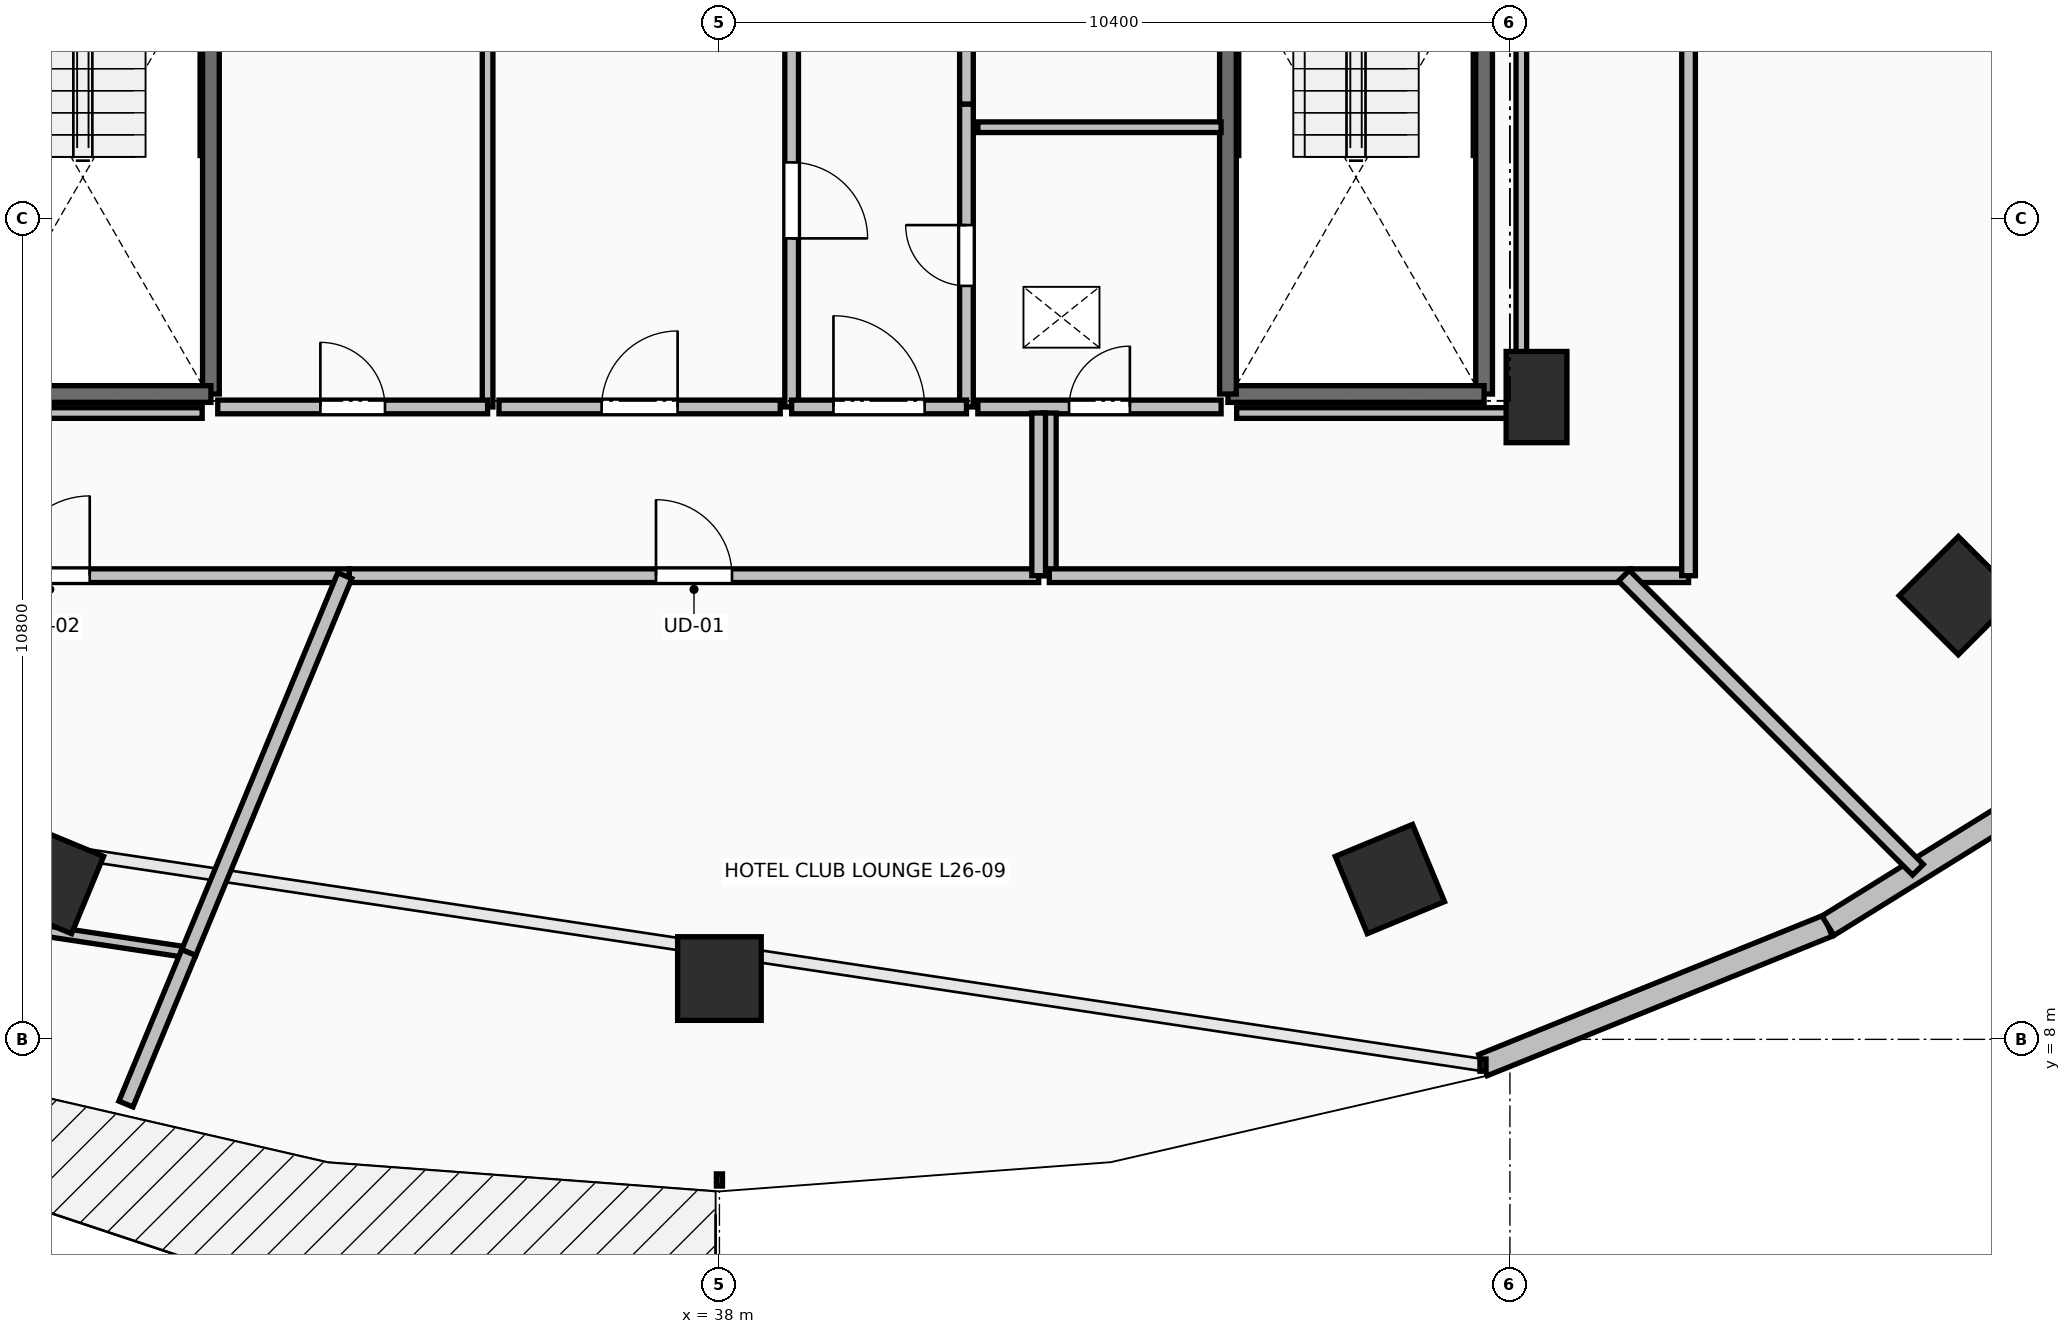
"""IFC4 building model, lengths in metres.
Left out: names, types, materials, properties, quantities, classifications, styles, units other than length and angle.
Written with IfcOpenShell. Run it as: python <this file> out.ifc"""

import sys

from ifc_helpers import new_model, si_unit, direction, frame, frame_2d, origin, origin_2d, place, context, subcontext, project, spatial, rectangle, extrude, element, fill, save


model = new_model("IFC4")
c1 = context("Model", 3, precision=1e-05, world=origin(), true_north=direction((0.0, 1.0)))
c2 = subcontext(c1, "Body", "Model", "MODEL_VIEW")
j1 = project(units=[si_unit("LENGTHUNIT", "METRE"), si_unit("PLANEANGLEUNIT", "RADIAN")], contexts=[c1])
p1 = place(None, origin())
s1 = spatial("IfcSite", under=j1, at=p1, CompositionType="ELEMENT")
p2 = place(p1, origin())
s2 = spatial("IfcBuilding", under=s1, at=p2, CompositionType="ELEMENT")
p3 = place(p2, frame((0.0, 0.0, 99.8)))
s3 = spatial("IfcBuildingStorey", under=s2, at=p3, CompositionType="ELEMENT", Elevation=99.8)
for number, where, z_axis, x_axis in (
    (1, (29.179, 10.109, 0.0), (0.0, 0.0, 1.0), (-0.383, -0.924, 0.0)),
    (2, (38.0, 8.8, 0.0), (0.0, 0.0, 1.0), (0.0, -1.0, 0.0)),
    (3, (46.821, 10.109, 0.0), (0.0, 0.0, 1.0), (0.383, -0.924, 0.0)),
    (4, (54.299, 13.838, 0.0), (0.0, 0.0, 1.0), (0.707, -0.707, 0.0)),
):
    element("IfcColumn", number, at=place(p3, frame(where, z_axis=z_axis, x_axis=x_axis)), inside=s3, PredefinedType="COLUMN", context=c2, shape_type="SweptSolid", body=[
        extrude(rectangle(XDim=1.1, YDim=1.1, at=origin_2d()), origin(), (0.0, 0.0, 1.0), 3.5),
    ])
p4 = place(p3, frame((48.75, 16.45, 0.0), z_axis=(0.0, 0.0, 1.0), x_axis=(1.0, 0.0, 0.0)))
e5 = element("IfcColumn", 5, at=p4, inside=s3, PredefinedType="PILASTER", context=c2, shape_type="SweptSolid", body=[
    extrude(rectangle(XDim=0.8, YDim=1.2, at=origin_2d()), origin(), (0.0, 0.0, 1.0), 3.5),
])
p5 = place(p3, frame((48.045, 7.661, 0.0), z_axis=(0.0, 0.0, 1.0), x_axis=(0.927122233109, 0.374759075775, 0.0)))
e6 = element("IfcWall", 6, at=p5, inside=s3, PredefinedType="STANDARD", context=c2, shape_type="SweptSolid", body=[
    extrude(rectangle(XDim=4.895, YDim=0.3, at=frame_2d((2.448, 0.0))), origin(), (0.0, 0.0, 1.0), 3.24),
])
p6 = place(p3, frame((52.584, 9.495, 0.0), z_axis=(0.0, 0.0, 1.0), x_axis=(0.849684479743, 0.527291461038, 0.0)))
e7 = element("IfcWall", 7, at=p6, inside=s3, PredefinedType="STANDARD", context=c2, shape_type="SweptSolid", body=[
    extrude(rectangle(XDim=4.681, YDim=0.3, at=frame_2d((2.341, 0.0))), origin(), (0.0, 0.0, 1.0), 3.24),
])
p7 = place(p3, frame((31.31, 23.91, 0.0), z_axis=(0.0, 0.0, 1.0), x_axis=(0.0, -1.0, 0.0)))
e8 = element("IfcWall", 8, at=p7, inside=s3, PredefinedType="SOLIDWALL", context=c2, shape_type="SweptSolid", body=[
    extrude(rectangle(XDim=7.42, YDim=0.22, at=frame_2d((3.71, 0.0))), origin(), (0.0, 0.0, 1.0), 3.24),
])
p8 = place(p3, frame((31.31, 16.49, 0.0), z_axis=(0.0, 0.0, 1.0), x_axis=(-1.0, 0.0, 0.0)))
e9 = element("IfcWall", 9, at=p8, inside=s3, PredefinedType="SOLIDWALL", context=c2, shape_type="SweptSolid", body=[
    extrude(rectangle(XDim=3.37, YDim=0.22, at=frame_2d((1.685, 0.0))), origin(), (0.0, 0.0, 1.0), 3.24),
])
p9 = place(p3, frame((48.06, 23.91, 0.0), z_axis=(0.0, 0.0, 1.0), x_axis=(0.0, -1.0, 0.0)))
e10 = element("IfcWall", 10, at=p9, inside=s3, PredefinedType="SOLIDWALL", context=c2, shape_type="SweptSolid", body=[
    extrude(rectangle(XDim=7.42, YDim=0.22, at=frame_2d((3.71, 0.0))), origin(), (0.0, 0.0, 1.0), 3.24),
])
p10 = place(p3, frame((48.06, 16.49, 0.0), z_axis=(0.0, 0.0, 1.0), x_axis=(-1.0, 0.0, 0.0)))
e11 = element("IfcWall", 11, at=p10, inside=s3, PredefinedType="SOLIDWALL", context=c2, shape_type="SweptSolid", body=[
    extrude(rectangle(XDim=3.37, YDim=0.22, at=frame_2d((1.685, 0.0))), origin(), (0.0, 0.0, 1.0), 3.24),
])
p11 = place(p3, frame((44.69, 16.49, 0.0), z_axis=(0.0, 0.0, 1.0), x_axis=(0.0, 1.0, 0.0)))
e12 = element("IfcWall", 12, at=p11, inside=s3, PredefinedType="SOLIDWALL", context=c2, shape_type="SweptSolid", body=[
    extrude(rectangle(XDim=7.42, YDim=0.22, at=frame_2d((3.71, 0.0))), origin(), (0.0, 0.0, 1.0), 3.24),
])
p12 = place(p3, frame((41.25, 16.32, 0.0), z_axis=(0.0, 0.0, 1.0), x_axis=(0.0, 1.0, 0.0)))
e13 = element("IfcWall", 13, at=p12, inside=s3, PredefinedType="PARTITIONING", context=c2, shape_type="SweptSolid", body=[
    extrude(rectangle(XDim=3.985, YDim=0.18, at=frame_2d((1.992, 0.0))), origin(), (0.0, 0.0, 1.0), 3.24),
])
p13 = place(p12, frame((1.593, 0.0, 0.0)))
e14 = element("IfcOpeningElement", 14, at=p13, cuts=e13, PredefinedType="OPENING", context=c2, shape_type="SweptSolid", body=[
    extrude(rectangle(XDim=0.8, YDim=2.05, at=frame_2d((0.4, 1.025))), frame((0.0, 0.105, 0.0), z_axis=(0.0, -1.0, 0.0), x_axis=(1.0, 0.0, 0.0)), (0.0, 0.0, 1.0), 0.21),
])
p14 = place(p3, frame((41.25, 20.305, 0.0), z_axis=(0.0, 0.0, 1.0), x_axis=(0.0, 1.0, 0.0)))
e15 = element("IfcWall", 15, at=p14, inside=s3, PredefinedType="PARTITIONING", context=c2, shape_type="SweptSolid", body=[
    extrude(rectangle(XDim=3.895, YDim=0.18, at=frame_2d((1.948, 0.0))), origin(), (0.0, 0.0, 1.0), 3.24),
])
p15 = place(p14, frame((1.448, 0.0, 0.0)))
e16 = element("IfcOpeningElement", 16, at=p15, cuts=e15, PredefinedType="OPENING", context=c2, shape_type="SweptSolid", body=[
    extrude(rectangle(XDim=1.0, YDim=2.15, at=frame_2d((0.5, 1.075))), frame((0.0, 0.105, 0.0), z_axis=(0.0, -1.0, 0.0), x_axis=(1.0, 0.0, 0.0)), (0.0, 0.0, 1.0), 0.21),
])
p16 = place(p3, frame((38.95, 21.755, 0.0), z_axis=(0.0, 0.0, 1.0), x_axis=(0.0, -1.0, 0.0)))
e17 = element("IfcWall", 17, at=p16, inside=s3, PredefinedType="PARTITIONING", context=c2, shape_type="SweptSolid", body=[
    extrude(rectangle(XDim=5.435, YDim=0.18, at=frame_2d((2.717, 0.0))), origin(), (0.0, 0.0, 1.0), 3.24),
])
p17 = place(p16, frame((2.218, 0.0, 0.0)))
e18 = element("IfcOpeningElement", 18, at=p17, cuts=e17, PredefinedType="OPENING", context=c2, shape_type="SweptSolid", body=[
    extrude(rectangle(XDim=1.0, YDim=2.15, at=frame_2d((0.5, 1.075))), frame((0.0, 0.105, 0.0), z_axis=(0.0, -1.0, 0.0), x_axis=(1.0, 0.0, 0.0)), (0.0, 0.0, 1.0), 0.21),
])
p18 = place(p3, frame((38.95, 16.32, 0.0), z_axis=(0.0, 0.0, 1.0), x_axis=(1.0, 0.0, 0.0)))
e19 = element("IfcWall", 19, at=p18, inside=s3, PredefinedType="PARTITIONING", context=c2, shape_type="SweptSolid", body=[
    extrude(rectangle(XDim=2.3, YDim=0.18, at=frame_2d((1.15, 0.0))), origin(), (0.0, 0.0, 1.0), 3.24),
])
p19 = place(p18, frame((0.55, 0.0, 0.0)))
e20 = element("IfcOpeningElement", 20, at=p19, cuts=e19, PredefinedType="OPENING", context=c2, shape_type="SweptSolid", body=[
    extrude(rectangle(XDim=1.2, YDim=2.15, at=frame_2d((0.6, 1.075))), frame((0.0, 0.105, 0.0), z_axis=(0.0, -1.0, 0.0), x_axis=(1.0, 0.0, 0.0)), (0.0, 0.0, 1.0), 0.21),
])
p20 = place(p3, frame((44.6, 20.0, 0.0), z_axis=(0.0, 0.0, 1.0), x_axis=(-1.0, 0.0, 0.0)))
e21 = element("IfcWall", 21, at=p20, inside=s3, PredefinedType="PARTITIONING", context=c2, shape_type="SweptSolid", body=[
    extrude(rectangle(XDim=3.2, YDim=0.14, at=frame_2d((1.6, 0.0))), origin(), (0.0, 0.0, 1.0), 3.24),
])
p21 = place(p3, frame((41.4, 16.32, 0.0), z_axis=(0.0, 0.0, 1.0), x_axis=(1.0, 0.0, 0.0)))
e22 = element("IfcWall", 22, at=p21, inside=s3, PredefinedType="PARTITIONING", context=c2, shape_type="SweptSolid", body=[
    extrude(rectangle(XDim=3.2, YDim=0.18, at=frame_2d((1.6, 0.0))), origin(), (0.0, 0.0, 1.0), 3.24),
])
p22 = place(p21, frame((1.2, 0.0, 0.0)))
e23 = element("IfcOpeningElement", 23, at=p22, cuts=e22, PredefinedType="OPENING", context=c2, shape_type="SweptSolid", body=[
    extrude(rectangle(XDim=0.8, YDim=2.05, at=frame_2d((0.4, 1.025))), frame((0.0, 0.105, 0.0), z_axis=(0.0, -1.0, 0.0), x_axis=(1.0, 0.0, 0.0)), (0.0, 0.0, 1.0), 0.21),
])
p23 = place(p3, frame((34.95, 16.32, 0.0), z_axis=(0.0, 0.0, 1.0), x_axis=(0.0, 1.0, 0.0)))
e24 = element("IfcWall", 24, at=p23, inside=s3, PredefinedType="PARTITIONING", context=c2, shape_type="SweptSolid", body=[
    extrude(rectangle(XDim=5.13, YDim=0.14, at=frame_2d((2.565, 0.0))), origin(), (0.0, 0.0, 1.0), 3.24),
])
p24 = place(p3, frame((31.4, 16.32, 0.0), z_axis=(0.0, 0.0, 1.0), x_axis=(1.0, 0.0, 0.0)))
e25 = element("IfcWall", 25, at=p24, inside=s3, PredefinedType="PARTITIONING", context=c2, shape_type="SweptSolid", body=[
    extrude(rectangle(XDim=3.55, YDim=0.18, at=frame_2d((1.775, 0.0))), origin(), (0.0, 0.0, 1.0), 3.24),
])
p25 = place(p24, frame((1.35, 0.0, 0.0)))
e26 = element("IfcOpeningElement", 26, at=p25, cuts=e25, PredefinedType="OPENING", context=c2, shape_type="SweptSolid", body=[
    extrude(rectangle(XDim=0.85, YDim=2.1, at=frame_2d((0.425, 1.05))), frame((0.0, 0.105, 0.0), z_axis=(0.0, -1.0, 0.0), x_axis=(1.0, 0.0, 0.0)), (0.0, 0.0, 1.0), 0.21),
])
p26 = place(p3, frame((35.1, 16.32, 0.0), z_axis=(0.0, 0.0, 1.0), x_axis=(1.0, 0.0, 0.0)))
e27 = element("IfcWall", 27, at=p26, inside=s3, PredefinedType="PARTITIONING", context=c2, shape_type="SweptSolid", body=[
    extrude(rectangle(XDim=3.7, YDim=0.18, at=frame_2d((1.85, 0.0))), origin(), (0.0, 0.0, 1.0), 3.24),
])
p27 = place(p26, frame((1.35, 0.0, 0.0)))
e28 = element("IfcOpeningElement", 28, at=p27, cuts=e27, PredefinedType="OPENING", context=c2, shape_type="SweptSolid", body=[
    extrude(rectangle(XDim=1.0, YDim=2.15, at=frame_2d((0.5, 1.075))), frame((0.0, 0.105, 0.0), z_axis=(0.0, -1.0, 0.0), x_axis=(1.0, 0.0, 0.0)), (0.0, 0.0, 1.0), 0.21),
])
p28 = place(p3, frame((25.25, 14.1, 0.0), z_axis=(0.0, 0.0, 1.0), x_axis=(1.0, 0.0, 0.0)))
e29 = element("IfcWall", 29, at=p28, inside=s3, PredefinedType="PARTITIONING", context=c2, shape_type="SweptSolid", body=[
    extrude(rectangle(XDim=7.881, YDim=0.18, at=frame_2d((3.94, 0.0))), origin(), (0.0, 0.0, 1.0), 2.432),
])
p29 = place(p28, frame((3.416, 0.0, 0.0)))
e30 = element("IfcOpeningElement", 30, at=p29, cuts=e29, PredefinedType="OPENING", context=c2, shape_type="SweptSolid", body=[
    extrude(rectangle(XDim=1.05, YDim=2.2, at=frame_2d((0.525, 1.1))), frame((0.0, 0.105, 0.0), z_axis=(0.0, -1.0, 0.0), x_axis=(1.0, 0.0, 0.0)), (0.0, 0.0, 1.0), 0.21),
])
p30 = place(p3, frame((42.34, 16.24, 0.0), z_axis=(0.0, 0.0, 1.0), x_axis=(0.0, -1.0, 0.0)))
e31 = element("IfcWall", 31, at=p30, inside=s3, PredefinedType="PARTITIONING", context=c2, shape_type="SweptSolid", body=[
    extrude(rectangle(XDim=2.14, YDim=0.18, at=frame_2d((1.07, 0.0))), origin(), (0.0, 0.0, 1.0), 3.24),
])
p31 = place(p3, frame((42.34, 14.1, 0.0), z_axis=(0.0, 0.0, 1.0), x_axis=(1.0, 0.0, 0.0)))
e32 = element("IfcWall", 32, at=p31, inside=s3, PredefinedType="PARTITIONING", context=c2, shape_type="SweptSolid", body=[
    extrude(rectangle(XDim=7.645, YDim=0.18, at=frame_2d((3.823, 0.0))), origin(), (0.0, 0.0, 1.0), 2.432),
])
p32 = place(p3, frame((33.131, 14.1, 0.0), z_axis=(0.0, 0.0, 1.0), x_axis=(1.0, 0.0, 0.0)))
e33 = element("IfcWall", 33, at=p32, inside=s3, PredefinedType="PARTITIONING", context=c2, shape_type="SweptSolid", body=[
    extrude(rectangle(XDim=9.069, YDim=0.18, at=frame_2d((4.534, 0.0))), origin(), (0.0, 0.0, 1.0), 2.886),
])
p33 = place(p32, frame((4.034, 0.0, 0.0)))
e34 = element("IfcOpeningElement", 34, at=p33, cuts=e33, PredefinedType="OPENING", context=c2, shape_type="SweptSolid", body=[
    extrude(rectangle(XDim=1.0, YDim=2.15, at=frame_2d((0.5, 1.075))), frame((0.0, 0.105, 0.0), z_axis=(0.0, -1.0, 0.0), x_axis=(1.0, 0.0, 0.0)), (0.0, 0.0, 1.0), 0.21),
])
p34 = place(p3, frame((42.2, 14.1, 0.0), z_axis=(0.0, 0.0, 1.0), x_axis=(0.0, 1.0, 0.0)))
e35 = element("IfcWall", 35, at=p34, inside=s3, PredefinedType="PARTITIONING", context=c2, shape_type="SweptSolid", body=[
    extrude(rectangle(XDim=2.14, YDim=0.18, at=frame_2d((1.07, 0.0))), origin(), (0.0, 0.0, 1.0), 3.24),
])
p35 = place(p3, frame((49.985, 14.1, 0.0), z_axis=(0.0, 0.0, 1.0), x_axis=(1.0, 0.0, 0.0)))
e36 = element("IfcWall", 36, at=p35, inside=s3, PredefinedType="PARTITIONING", context=c2, shape_type="SweptSolid", body=[
    extrude(rectangle(XDim=0.765, YDim=0.18, at=frame_2d((0.382, 0.0))), origin(), (0.0, 0.0, 1.0), 2.972),
])
p36 = place(p3, frame((50.75, 14.1, 0.0), z_axis=(0.0, 0.0, 1.0), x_axis=(0.0, 1.0, 0.0)))
e37 = element("IfcWall", 37, at=p36, inside=s3, PredefinedType="PARTITIONING", context=c2, shape_type="SweptSolid", body=[
    extrude(rectangle(XDim=16.981, YDim=0.18, at=frame_2d((8.49, 0.0))), origin(), (0.0, 0.0, 1.0), 2.432),
])
p37 = place(p36, frame((7.99, 0.0, 0.0)))
e38 = element("IfcOpeningElement", 38, at=p37, cuts=e37, PredefinedType="OPENING", context=c2, shape_type="SweptSolid", body=[
    extrude(rectangle(XDim=1.0, YDim=2.15, at=frame_2d((0.5, 1.075))), frame((0.0, 0.105, 0.0), z_axis=(0.0, -1.0, 0.0), x_axis=(1.0, 0.0, 0.0)), (0.0, 0.0, 1.0), 0.21),
])
p38 = place(p3, frame((28.938, 9.455, 0.0), z_axis=(0.0, 0.0, 1.0), x_axis=(0.988868142427, -0.148794478708, 0.0)))
e39 = element("IfcWall", 39, at=p38, inside=s3, PredefinedType="PARTITIONING", context=c2, shape_type="SweptSolid", body=[
    extrude(rectangle(XDim=2.104, YDim=0.14, at=frame_2d((1.052, 0.0))), origin(), (0.0, 0.0, 1.0), 3.24),
])
p39 = place(p3, frame((31.018, 9.142, 0.0), z_axis=(0.0, 0.0, 1.0), x_axis=(0.382572793579, 0.923925352836, 0.0)))
e40 = element("IfcWall", 40, at=p39, inside=s3, PredefinedType="PARTITIONING", context=c2, shape_type="SweptSolid", body=[
    extrude(rectangle(XDim=5.366, YDim=0.2, at=frame_2d((2.683, 0.0))), origin(), (0.0, 0.0, 1.0), 2.677),
])
p40 = place(p3, frame((30.192, 7.149, 0.0), z_axis=(0.0, 0.0, 1.0), x_axis=(0.382911401564, 0.923785071622, 0.0)))
e41 = element("IfcWall", 41, at=p40, inside=s3, PredefinedType="PARTITIONING", context=c2, shape_type="SweptSolid", body=[
    extrude(rectangle(XDim=2.158, YDim=0.2, at=frame_2d((1.079, 0.0))), origin(), (0.0, 0.0, 1.0), 3.24),
])
p41 = place(p3, frame((53.768, 10.232, 0.0), z_axis=(0.0, 0.0, 1.0), x_axis=(-0.707106781187, 0.707106781187, 0.0)))
e42 = element("IfcWall", 42, at=p41, inside=s3, PredefinedType="PARTITIONING", context=c2, shape_type="SweptSolid", body=[
    extrude(rectangle(XDim=5.47, YDim=0.2, at=frame_2d((2.735, 0.0))), origin(), (0.0, 0.0, 1.0), 2.677),
])
p42 = place(p3, frame((48.55, 23.754, 0.0), z_axis=(0.0, 0.0, 1.0), x_axis=(0.0, -1.0, 0.0)))
e43 = element("IfcWall", 43, at=p42, inside=s3, PredefinedType="PARTITIONING", context=c2, shape_type="SweptSolid", body=[
    extrude(rectangle(XDim=7.514, YDim=0.14, at=frame_2d((3.757, 0.0))), origin(), (0.0, 0.0, 1.0), 2.432),
])
for number, where, z_axis, x_axis in (
    (44, (48.55, 16.24, 0.0), (0.0, 0.0, 1.0), (-1.0, 0.0, 0.0)),
    (45, (31.195, 16.24, 0.0), (0.0, 0.0, 1.0), (-1.0, 0.0, 0.0)),
):
    element("IfcWall", number, at=place(p3, frame(where, z_axis=z_axis, x_axis=x_axis)), inside=s3, PredefinedType="PARTITIONING", context=c2, shape_type="SweptSolid", body=[
        extrude(rectangle(XDim=3.745, YDim=0.14, at=frame_2d((1.873, 0.0))), origin(), (0.0, 0.0, 1.0), 2.432),
    ])
p43 = place(p13, origin())
e46 = element("IfcDoor", 46, at=p43, inside=s3, OperationType="SINGLE_SWING_RIGHT", PredefinedType="DOOR", context=c2, shape_type="SweptSolid", body=[
    extrude(rectangle(XDim=0.8, YDim=2.05, at=frame_2d((0.4, 1.025))), frame((0.0, 0.025, 0.0), z_axis=(0.0, -1.0, 0.0), x_axis=(1.0, 0.0, 0.0)), (0.0, 0.0, 1.0), 0.05),
])
fill(e14, e46)
p44 = place(p17, origin())
e47 = element("IfcDoor", 47, at=p44, inside=s3, OperationType="SINGLE_SWING_RIGHT", PredefinedType="DOOR", context=c2, shape_type="SweptSolid", body=[
    extrude(rectangle(XDim=1.0, YDim=2.15, at=frame_2d((0.5, 1.075))), frame((0.0, 0.025, 0.0), z_axis=(0.0, -1.0, 0.0), x_axis=(1.0, 0.0, 0.0)), (0.0, 0.0, 1.0), 0.05),
])
fill(e18, e47)
p45 = place(p19, origin())
e48 = element("IfcDoor", 48, at=p45, inside=s3, OperationType="SINGLE_SWING_LEFT", PredefinedType="DOOR", context=c2, shape_type="SweptSolid", body=[
    extrude(rectangle(XDim=1.2, YDim=2.15, at=frame_2d((0.6, 1.075))), frame((0.0, 0.025, 0.0), z_axis=(0.0, -1.0, 0.0), x_axis=(1.0, 0.0, 0.0)), (0.0, 0.0, 1.0), 0.05),
])
fill(e20, e48)
p46 = place(p22, origin())
e49 = element("IfcDoor", 49, at=p46, inside=s3, OperationType="SINGLE_SWING_RIGHT", PredefinedType="DOOR", context=c2, shape_type="SweptSolid", body=[
    extrude(rectangle(XDim=0.8, YDim=2.05, at=frame_2d((0.4, 1.025))), frame((0.0, 0.025, 0.0), z_axis=(0.0, -1.0, 0.0), x_axis=(1.0, 0.0, 0.0)), (0.0, 0.0, 1.0), 0.05),
])
fill(e23, e49)
p47 = place(p25, origin())
e50 = element("IfcDoor", 50, at=p47, inside=s3, OperationType="SINGLE_SWING_LEFT", PredefinedType="DOOR", context=c2, shape_type="SweptSolid", body=[
    extrude(rectangle(XDim=0.85, YDim=2.1, at=frame_2d((0.425, 1.05))), frame((0.0, 0.025, 0.0), z_axis=(0.0, -1.0, 0.0), x_axis=(1.0, 0.0, 0.0)), (0.0, 0.0, 1.0), 0.05),
])
fill(e26, e50)
p48 = place(p27, origin())
e51 = element("IfcDoor", 51, at=p48, inside=s3, OperationType="SINGLE_SWING_RIGHT", PredefinedType="DOOR", context=c2, shape_type="SweptSolid", body=[
    extrude(rectangle(XDim=1.0, YDim=2.15, at=frame_2d((0.5, 1.075))), frame((0.0, 0.025, 0.0), z_axis=(0.0, -1.0, 0.0), x_axis=(1.0, 0.0, 0.0)), (0.0, 0.0, 1.0), 0.05),
])
fill(e28, e51)
p49 = place(p29, origin())
e52 = element("IfcDoor", 52, at=p49, inside=s3, OperationType="SINGLE_SWING_RIGHT", PredefinedType="DOOR", context=c2, shape_type="SweptSolid", body=[
    extrude(rectangle(XDim=1.05, YDim=2.2, at=frame_2d((0.525, 1.1))), frame((0.0, 0.025, 0.0), z_axis=(0.0, -1.0, 0.0), x_axis=(1.0, 0.0, 0.0)), (0.0, 0.0, 1.0), 0.05),
])
fill(e30, e52)
p50 = place(p33, origin())
e53 = element("IfcDoor", 53, at=p50, inside=s3, OperationType="SINGLE_SWING_LEFT", PredefinedType="DOOR", context=c2, shape_type="SweptSolid", body=[
    extrude(rectangle(XDim=1.0, YDim=2.15, at=frame_2d((0.5, 1.075))), frame((0.0, 0.025, 0.0), z_axis=(0.0, -1.0, 0.0), x_axis=(1.0, 0.0, 0.0)), (0.0, 0.0, 1.0), 0.05),
])
fill(e34, e53)
save(model, sys.argv[1])
